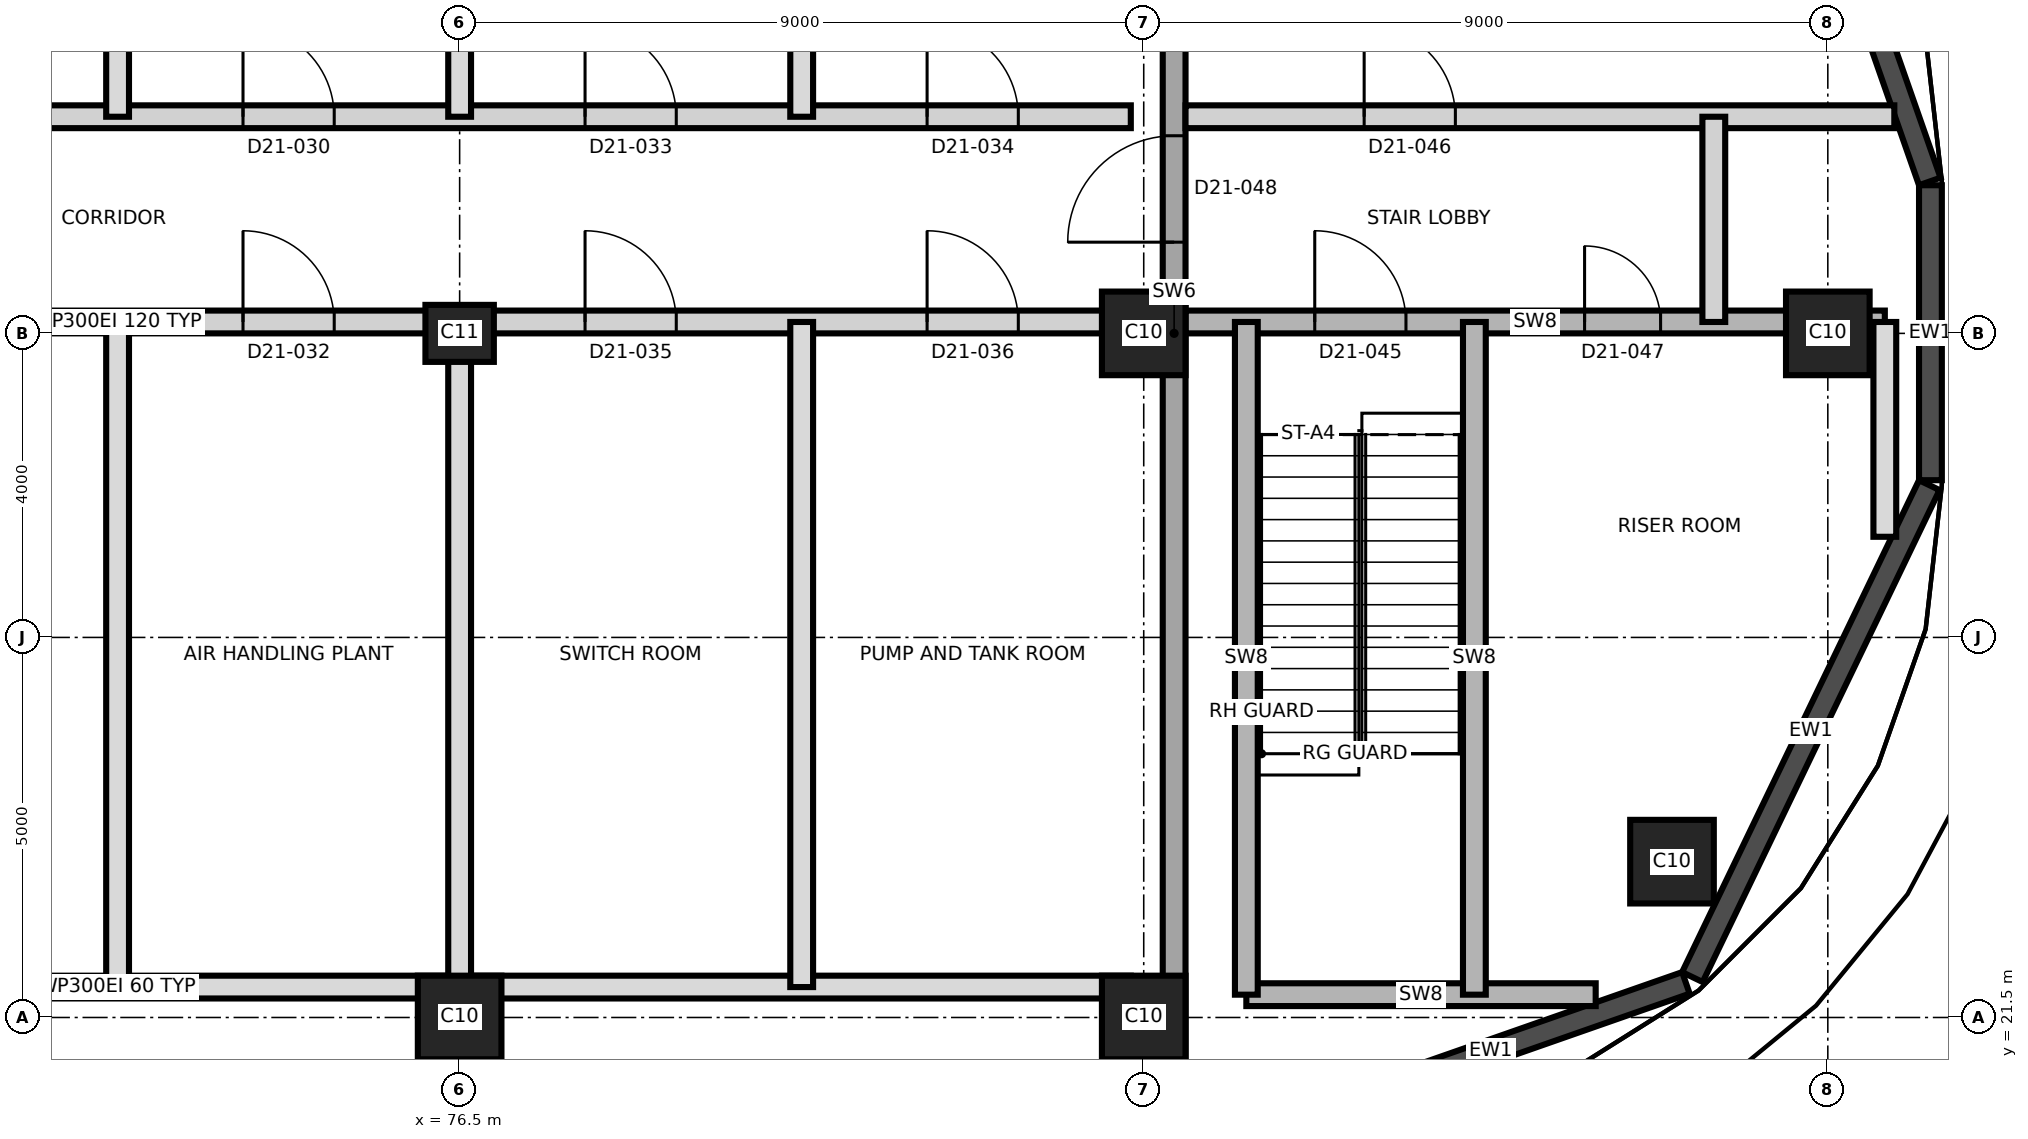
"""IFC4 building model, lengths in metres.
Left out: names, types, materials, properties, quantities, classifications, styles, units other than length and angle.
Written with IfcOpenShell. Run it as: python <this file> out.ifc"""

import sys

from ifc_helpers import new_model, si_unit, direction, frame, frame_2d, origin, origin_2d, place, context, subcontext, project, spatial, rectangle, extrude, element, fill, save


model = new_model("IFC4")
c1 = context("Model", 3, precision=1e-05, world=origin(), true_north=direction((0.0, 1.0)))
c2 = subcontext(c1, "Body", "Model", "MODEL_VIEW")
j1 = project(units=[si_unit("LENGTHUNIT", "METRE"), si_unit("PLANEANGLEUNIT", "RADIAN")], contexts=[c1])
p1 = place(None, origin())
s1 = spatial("IfcSite", under=j1, at=p1, CompositionType="ELEMENT")
p2 = place(p1, origin())
s2 = spatial("IfcBuilding", under=s1, at=p2, CompositionType="ELEMENT")
p3 = place(p2, frame((0.0, 0.0, 190.3)))
s3 = spatial("IfcBuildingStorey", under=s2, at=p3, CompositionType="ELEMENT", Elevation=190.3)
for number, where, z_axis, x_axis in (
    (1, (76.5, 21.5, 0.0), (0.0, 0.0, 1.0), (1.0, 0.0, 0.0)),
    (2, (85.5, 21.5, 0.0), (0.0, 0.0, 1.0), (1.0, 0.0, 0.0)),
    (3, (92.45, 23.55, 0.0), (0.0, 0.0, 1.0), (1.0, 0.0, 0.0)),
):
    element("IfcColumn", number, at=place(p3, frame(where, z_axis=z_axis, x_axis=x_axis)), inside=s3, PredefinedType="COLUMN", context=c2, shape_type="SweptSolid", body=[
        extrude(rectangle(XDim=1.1, YDim=1.1, at=origin_2d()), origin(), (0.0, 0.0, 1.0), 5.5),
    ])
p4 = place(p3, frame((76.5, 30.5, 0.0), z_axis=(0.0, 0.0, 1.0), x_axis=(1.0, 0.0, 0.0)))
e4 = element("IfcColumn", 4, at=p4, inside=s3, PredefinedType="COLUMN", context=c2, shape_type="SweptSolid", body=[
    extrude(rectangle(XDim=0.9, YDim=0.75, at=origin_2d()), origin(), (0.0, 0.0, 1.0), 5.5),
])
for number, where, z_axis, x_axis in (
    (5, (85.5, 30.5, 0.0), (0.0, 0.0, 1.0), (1.0, 0.0, 0.0)),
    (6, (94.5, 30.5, 0.0), (0.0, 0.0, 1.0), (1.0, 0.0, 0.0)),
):
    element("IfcColumn", number, at=place(p3, frame(where, z_axis=z_axis, x_axis=x_axis)), inside=s3, PredefinedType="COLUMN", context=c2, shape_type="SweptSolid", body=[
        extrude(rectangle(XDim=1.1, YDim=1.1, at=origin_2d()), origin(), (0.0, 0.0, 1.0), 5.5),
    ])
p5 = place(p3, frame((85.9, 20.35, 0.0), z_axis=(0.0, 0.0, 1.0), x_axis=(0.0, 1.0, 0.0)))
e7 = element("IfcWall", 7, at=p5, inside=s3, PredefinedType="SHEAR", context=c2, shape_type="SweptSolid", body=[
    extrude(rectangle(XDim=20.3, YDim=0.3, at=frame_2d((10.15, 0.0))), origin(), (0.0, 0.0, 1.0), 5.5),
])
p6 = place(p5, frame((11.35, 0.0, 0.0)))
e8 = element("IfcOpeningElement", 8, at=p6, cuts=e7, PredefinedType="OPENING", context=c2, shape_type="SweptSolid", body=[
    extrude(rectangle(XDim=1.4, YDim=2.1, at=frame_2d((0.7, 1.05))), frame((0.0, 0.16, 0.0), z_axis=(0.0, -1.0, 0.0), x_axis=(1.0, 0.0, 0.0)), (0.0, 0.0, 1.0), 0.32),
])
p7 = place(p3, frame((87.499, 20.158, 0.0), z_axis=(0.0, 0.0, 1.0), x_axis=(0.943879346284, 0.330290447423, 0.0)))
e9 = element("IfcWall", 9, at=p7, inside=s3, PredefinedType="SOLIDWALL", context=c2, shape_type="SweptSolid", body=[
    extrude(rectangle(XDim=5.439, YDim=0.3, at=frame_2d((2.72, 0.0))), origin(), (0.0, 0.0, 1.0), 5.2),
])
p8 = place(p3, frame((92.719, 22.031, 0.0), z_axis=(0.0, 0.0, 1.0), x_axis=(0.433882040461, 0.90096968593, 0.0)))
e10 = element("IfcWall", 10, at=p8, inside=s3, PredefinedType="SOLIDWALL", context=c2, shape_type="SweptSolid", body=[
    extrude(rectangle(XDim=7.183, YDim=0.3, at=frame_2d((3.592, 0.0))), origin(), (0.0, 0.0, 1.0), 5.2),
])
p9 = place(p3, frame((95.85, 28.568, 0.0), z_axis=(0.0, 0.0, 1.0), x_axis=(0.0, 1.0, 0.0)))
e11 = element("IfcWall", 11, at=p9, inside=s3, PredefinedType="SOLIDWALL", context=c2, shape_type="SweptSolid", body=[
    extrude(rectangle(XDim=3.881, YDim=0.3, at=frame_2d((1.94, 0.0))), origin(), (0.0, 0.0, 1.0), 5.2),
])
p10 = place(p3, frame((95.842, 32.499, 0.0), z_axis=(0.0, 0.0, 1.0), x_axis=(-0.330290447423, 0.943879346284, 0.0)))
e12 = element("IfcWall", 12, at=p10, inside=s3, PredefinedType="SOLIDWALL", context=c2, shape_type="SweptSolid", body=[
    extrude(rectangle(XDim=5.439, YDim=0.3, at=frame_2d((2.72, 0.0))), origin(), (0.0, 0.0, 1.0), 5.2),
])
p11 = place(p3, frame((86.85, 21.8, 0.0), z_axis=(0.0, 0.0, 1.0), x_axis=(1.0, 0.0, 0.0)))
e13 = element("IfcWall", 13, at=p11, inside=s3, PredefinedType="SHEAR", context=c2, shape_type="SweptSolid", body=[
    extrude(rectangle(XDim=4.596, YDim=0.3, at=frame_2d((2.298, 0.0))), origin(), (0.0, 0.0, 1.0), 5.2),
])
p12 = place(p3, frame((58.65, 21.9, 0.0), z_axis=(0.0, 0.0, 1.0), x_axis=(1.0, 0.0, 0.0)))
e14 = element("IfcWall", 14, at=p12, inside=s3, PredefinedType="PARTITIONING", context=c2, shape_type="SweptSolid", body=[
    extrude(rectangle(XDim=26.68, YDim=0.3, at=frame_2d((13.34, 0.0))), origin(), (0.0, 0.0, 1.0), 5.2),
])
p13 = place(p3, frame((58.65, 30.65, 0.0), z_axis=(0.0, 0.0, 1.0), x_axis=(1.0, 0.0, 0.0)))
e15 = element("IfcWall", 15, at=p13, inside=s3, PredefinedType="PARTITIONING", context=c2, shape_type="SweptSolid", body=[
    extrude(rectangle(XDim=26.68, YDim=0.3, at=frame_2d((13.34, 0.0))), origin(), (0.0, 0.0, 1.0), 5.2),
])
p14 = place(p13, frame((1.5, 0.0, 0.0)))
e16 = element("IfcOpeningElement", 16, at=p14, cuts=e15, PredefinedType="OPENING", context=c2, shape_type="SweptSolid", body=[
    extrude(rectangle(XDim=1.2, YDim=2.1, at=frame_2d((0.6, 1.05))), frame((0.0, 0.16, 0.0), z_axis=(0.0, -1.0, 0.0), x_axis=(1.0, 0.0, 0.0)), (0.0, 0.0, 1.0), 0.32),
])
p15 = place(p13, frame((6.0, 0.0, 0.0)))
e17 = element("IfcOpeningElement", 17, at=p15, cuts=e15, PredefinedType="OPENING", context=c2, shape_type="SweptSolid", body=[
    extrude(rectangle(XDim=1.2, YDim=2.1, at=frame_2d((0.6, 1.05))), frame((0.0, 0.16, 0.0), z_axis=(0.0, -1.0, 0.0), x_axis=(1.0, 0.0, 0.0)), (0.0, 0.0, 1.0), 0.32),
])
p16 = place(p13, frame((10.5, 0.0, 0.0)))
e18 = element("IfcOpeningElement", 18, at=p16, cuts=e15, PredefinedType="OPENING", context=c2, shape_type="SweptSolid", body=[
    extrude(rectangle(XDim=1.2, YDim=2.1, at=frame_2d((0.6, 1.05))), frame((0.0, 0.16, 0.0), z_axis=(0.0, -1.0, 0.0), x_axis=(1.0, 0.0, 0.0)), (0.0, 0.0, 1.0), 0.32),
])
p17 = place(p13, frame((15.0, 0.0, 0.0)))
e19 = element("IfcOpeningElement", 19, at=p17, cuts=e15, PredefinedType="OPENING", context=c2, shape_type="SweptSolid", body=[
    extrude(rectangle(XDim=1.2, YDim=2.1, at=frame_2d((0.6, 1.05))), frame((0.0, 0.16, 0.0), z_axis=(0.0, -1.0, 0.0), x_axis=(1.0, 0.0, 0.0)), (0.0, 0.0, 1.0), 0.32),
])
p18 = place(p13, frame((19.5, 0.0, 0.0)))
e20 = element("IfcOpeningElement", 20, at=p18, cuts=e15, PredefinedType="OPENING", context=c2, shape_type="SweptSolid", body=[
    extrude(rectangle(XDim=1.2, YDim=2.1, at=frame_2d((0.6, 1.05))), frame((0.0, 0.16, 0.0), z_axis=(0.0, -1.0, 0.0), x_axis=(1.0, 0.0, 0.0)), (0.0, 0.0, 1.0), 0.32),
])
p19 = place(p13, frame((24.0, 0.0, 0.0)))
e21 = element("IfcOpeningElement", 21, at=p19, cuts=e15, PredefinedType="OPENING", context=c2, shape_type="SweptSolid", body=[
    extrude(rectangle(XDim=1.2, YDim=2.1, at=frame_2d((0.6, 1.05))), frame((0.0, 0.16, 0.0), z_axis=(0.0, -1.0, 0.0), x_axis=(1.0, 0.0, 0.0)), (0.0, 0.0, 1.0), 0.32),
])
p20 = place(p3, frame((86.05, 30.65, 0.0), z_axis=(0.0, 0.0, 1.0), x_axis=(1.0, 0.0, 0.0)))
e22 = element("IfcWall", 22, at=p20, inside=s3, PredefinedType="SHEAR", context=c2, shape_type="SweptSolid", body=[
    extrude(rectangle(XDim=9.2, YDim=0.3, at=frame_2d((4.6, 0.0))), origin(), (0.0, 0.0, 1.0), 5.2),
])
p21 = place(p20, frame((1.7, 0.0, 0.0)))
e23 = element("IfcOpeningElement", 23, at=p21, cuts=e22, PredefinedType="OPENING", context=c2, shape_type="SweptSolid", body=[
    extrude(rectangle(XDim=1.2, YDim=2.1, at=frame_2d((0.6, 1.05))), frame((0.0, 0.16, 0.0), z_axis=(0.0, -1.0, 0.0), x_axis=(1.0, 0.0, 0.0)), (0.0, 0.0, 1.0), 0.32),
])
p22 = place(p20, frame((5.25, 0.0, 0.0)))
e24 = element("IfcOpeningElement", 24, at=p22, cuts=e22, PredefinedType="OPENING", context=c2, shape_type="SweptSolid", body=[
    extrude(rectangle(XDim=1.0, YDim=2.1, at=frame_2d((0.5, 1.05))), frame((0.0, 0.16, 0.0), z_axis=(0.0, -1.0, 0.0), x_axis=(1.0, 0.0, 0.0)), (0.0, 0.0, 1.0), 0.32),
])
p23 = place(p3, frame((58.65, 33.35, 0.0), z_axis=(0.0, 0.0, 1.0), x_axis=(1.0, 0.0, 0.0)))
e25 = element("IfcWall", 25, at=p23, inside=s3, PredefinedType="PARTITIONING", context=c2, shape_type="SweptSolid", body=[
    extrude(rectangle(XDim=26.68, YDim=0.3, at=frame_2d((13.34, 0.0))), origin(), (0.0, 0.0, 1.0), 5.2),
])
p24 = place(p23, frame((1.5, 0.0, 0.0)))
e26 = element("IfcOpeningElement", 26, at=p24, cuts=e25, PredefinedType="OPENING", context=c2, shape_type="SweptSolid", body=[
    extrude(rectangle(XDim=1.2, YDim=2.1, at=frame_2d((0.6, 1.05))), frame((0.0, 0.16, 0.0), z_axis=(0.0, -1.0, 0.0), x_axis=(1.0, 0.0, 0.0)), (0.0, 0.0, 1.0), 0.32),
])
p25 = place(p23, frame((6.0, 0.0, 0.0)))
e27 = element("IfcOpeningElement", 27, at=p25, cuts=e25, PredefinedType="OPENING", context=c2, shape_type="SweptSolid", body=[
    extrude(rectangle(XDim=1.2, YDim=2.1, at=frame_2d((0.6, 1.05))), frame((0.0, 0.16, 0.0), z_axis=(0.0, -1.0, 0.0), x_axis=(1.0, 0.0, 0.0)), (0.0, 0.0, 1.0), 0.32),
])
p26 = place(p23, frame((10.5, 0.0, 0.0)))
e28 = element("IfcOpeningElement", 28, at=p26, cuts=e25, PredefinedType="OPENING", context=c2, shape_type="SweptSolid", body=[
    extrude(rectangle(XDim=1.2, YDim=2.1, at=frame_2d((0.6, 1.05))), frame((0.0, 0.16, 0.0), z_axis=(0.0, -1.0, 0.0), x_axis=(1.0, 0.0, 0.0)), (0.0, 0.0, 1.0), 0.32),
])
p27 = place(p23, frame((15.0, 0.0, 0.0)))
e29 = element("IfcOpeningElement", 29, at=p27, cuts=e25, PredefinedType="OPENING", context=c2, shape_type="SweptSolid", body=[
    extrude(rectangle(XDim=1.2, YDim=2.1, at=frame_2d((0.6, 1.05))), frame((0.0, 0.16, 0.0), z_axis=(0.0, -1.0, 0.0), x_axis=(1.0, 0.0, 0.0)), (0.0, 0.0, 1.0), 0.32),
])
p28 = place(p23, frame((19.5, 0.0, 0.0)))
e30 = element("IfcOpeningElement", 30, at=p28, cuts=e25, PredefinedType="OPENING", context=c2, shape_type="SweptSolid", body=[
    extrude(rectangle(XDim=1.2, YDim=2.1, at=frame_2d((0.6, 1.05))), frame((0.0, 0.16, 0.0), z_axis=(0.0, -1.0, 0.0), x_axis=(1.0, 0.0, 0.0)), (0.0, 0.0, 1.0), 0.32),
])
p29 = place(p23, frame((24.0, 0.0, 0.0)))
e31 = element("IfcOpeningElement", 31, at=p29, cuts=e25, PredefinedType="OPENING", context=c2, shape_type="SweptSolid", body=[
    extrude(rectangle(XDim=1.2, YDim=2.1, at=frame_2d((0.6, 1.05))), frame((0.0, 0.16, 0.0), z_axis=(0.0, -1.0, 0.0), x_axis=(1.0, 0.0, 0.0)), (0.0, 0.0, 1.0), 0.32),
])
p30 = place(p3, frame((86.05, 33.35, 0.0), z_axis=(0.0, 0.0, 1.0), x_axis=(1.0, 0.0, 0.0)))
e32 = element("IfcWall", 32, at=p30, inside=s3, PredefinedType="PARTITIONING", context=c2, shape_type="SweptSolid", body=[
    extrude(rectangle(XDim=9.325, YDim=0.3, at=frame_2d((4.663, 0.0))), origin(), (0.0, 0.0, 1.0), 5.2),
])
p31 = place(p30, frame((2.35, 0.0, 0.0)))
e33 = element("IfcOpeningElement", 33, at=p31, cuts=e32, PredefinedType="OPENING", context=c2, shape_type="SweptSolid", body=[
    extrude(rectangle(XDim=1.2, YDim=2.1, at=frame_2d((0.6, 1.05))), frame((0.0, 0.16, 0.0), z_axis=(0.0, -1.0, 0.0), x_axis=(1.0, 0.0, 0.0)), (0.0, 0.0, 1.0), 0.32),
])
p32 = place(p3, frame((72.0, 21.9, 0.0), z_axis=(0.0, 0.0, 1.0), x_axis=(0.0, 1.0, 0.0)))
e34 = element("IfcWall", 34, at=p32, inside=s3, PredefinedType="PARTITIONING", context=c2, shape_type="SweptSolid", body=[
    extrude(rectangle(XDim=8.75, YDim=0.3, at=frame_2d((4.375, 0.0))), origin(), (0.0, 0.0, 1.0), 5.2),
])
p33 = place(p3, frame((72.0, 33.35, 0.0), z_axis=(0.0, 0.0, 1.0), x_axis=(0.0, 1.0, 0.0)))
e35 = element("IfcWall", 35, at=p33, inside=s3, PredefinedType="PARTITIONING", context=c2, shape_type="SweptSolid", body=[
    extrude(rectangle(XDim=5.75, YDim=0.3, at=frame_2d((2.875, 0.0))), origin(), (0.0, 0.0, 1.0), 5.2),
])
p34 = place(p3, frame((76.5, 21.9, 0.0), z_axis=(0.0, 0.0, 1.0), x_axis=(0.0, 1.0, 0.0)))
e36 = element("IfcWall", 36, at=p34, inside=s3, PredefinedType="PARTITIONING", context=c2, shape_type="SweptSolid", body=[
    extrude(rectangle(XDim=8.75, YDim=0.3, at=frame_2d((4.375, 0.0))), origin(), (0.0, 0.0, 1.0), 5.2),
])
p35 = place(p3, frame((76.5, 33.35, 0.0), z_axis=(0.0, 0.0, 1.0), x_axis=(0.0, 1.0, 0.0)))
e37 = element("IfcWall", 37, at=p35, inside=s3, PredefinedType="PARTITIONING", context=c2, shape_type="SweptSolid", body=[
    extrude(rectangle(XDim=5.75, YDim=0.3, at=frame_2d((2.875, 0.0))), origin(), (0.0, 0.0, 1.0), 5.2),
])
p36 = place(p3, frame((81.0, 21.9, 0.0), z_axis=(0.0, 0.0, 1.0), x_axis=(0.0, 1.0, 0.0)))
e38 = element("IfcWall", 38, at=p36, inside=s3, PredefinedType="PARTITIONING", context=c2, shape_type="SweptSolid", body=[
    extrude(rectangle(XDim=8.75, YDim=0.3, at=frame_2d((4.375, 0.0))), origin(), (0.0, 0.0, 1.0), 5.2),
])
p37 = place(p3, frame((81.0, 33.35, 0.0), z_axis=(0.0, 0.0, 1.0), x_axis=(0.0, 1.0, 0.0)))
e39 = element("IfcWall", 39, at=p37, inside=s3, PredefinedType="PARTITIONING", context=c2, shape_type="SweptSolid", body=[
    extrude(rectangle(XDim=5.75, YDim=0.3, at=frame_2d((2.875, 0.0))), origin(), (0.0, 0.0, 1.0), 5.2),
])
for number, where, z_axis, x_axis in (
    (40, (86.85, 21.8, 0.0), (0.0, 0.0, 1.0), (0.0, 1.0, 0.0)),
    (41, (89.85, 21.8, 0.0), (0.0, 0.0, 1.0), (0.0, 1.0, 0.0)),
):
    element("IfcWall", number, at=place(p3, frame(where, z_axis=z_axis, x_axis=x_axis)), inside=s3, PredefinedType="SHEAR", context=c2, shape_type="SweptSolid", body=[
        extrude(rectangle(XDim=8.85, YDim=0.3, at=frame_2d((4.425, 0.0))), origin(), (0.0, 0.0, 1.0), 5.2),
    ])
p38 = place(p3, frame((93.0, 30.65, 0.0), z_axis=(0.0, 0.0, 1.0), x_axis=(0.0, 1.0, 0.0)))
e42 = element("IfcWall", 42, at=p38, inside=s3, PredefinedType="PARTITIONING", context=c2, shape_type="SweptSolid", body=[
    extrude(rectangle(XDim=2.7, YDim=0.3, at=frame_2d((1.35, 0.0))), origin(), (0.0, 0.0, 1.0), 5.2),
])
p39 = place(p3, frame((95.25, 27.824, 0.0), z_axis=(0.0, 0.0, 1.0), x_axis=(0.0, 1.0, 0.0)))
e43 = element("IfcWall", 43, at=p39, inside=s3, PredefinedType="PARTITIONING", context=c2, shape_type="SweptSolid", body=[
    extrude(rectangle(XDim=2.826, YDim=0.3, at=frame_2d((1.413, 0.0))), origin(), (0.0, 0.0, 1.0), 5.2),
])
p40 = place(p27, origin())
e44 = element("IfcDoor", 44, at=p40, inside=s3, OperationType="SINGLE_SWING_RIGHT", PredefinedType="DOOR", context=c2, shape_type="SweptSolid", body=[
    extrude(rectangle(XDim=1.2, YDim=2.1, at=frame_2d((0.6, 1.05))), frame((0.0, 0.025, 0.0), z_axis=(0.0, -1.0, 0.0), x_axis=(1.0, 0.0, 0.0)), (0.0, 0.0, 1.0), 0.05),
])
fill(e29, e44)
p41 = place(p17, origin())
e45 = element("IfcDoor", 45, at=p41, inside=s3, OperationType="SINGLE_SWING_LEFT", PredefinedType="DOOR", context=c2, shape_type="SweptSolid", body=[
    extrude(rectangle(XDim=1.2, YDim=2.1, at=frame_2d((0.6, 1.05))), frame((0.0, 0.025, 0.0), z_axis=(0.0, -1.0, 0.0), x_axis=(1.0, 0.0, 0.0)), (0.0, 0.0, 1.0), 0.05),
])
fill(e19, e45)
p42 = place(p28, origin())
e46 = element("IfcDoor", 46, at=p42, inside=s3, OperationType="SINGLE_SWING_RIGHT", PredefinedType="DOOR", context=c2, shape_type="SweptSolid", body=[
    extrude(rectangle(XDim=1.2, YDim=2.1, at=frame_2d((0.6, 1.05))), frame((0.0, 0.025, 0.0), z_axis=(0.0, -1.0, 0.0), x_axis=(1.0, 0.0, 0.0)), (0.0, 0.0, 1.0), 0.05),
])
fill(e30, e46)
p43 = place(p29, origin())
e47 = element("IfcDoor", 47, at=p43, inside=s3, OperationType="SINGLE_SWING_LEFT", PredefinedType="DOOR", context=c2, shape_type="SweptSolid", body=[
    extrude(rectangle(XDim=1.2, YDim=2.1, at=frame_2d((0.6, 1.05))), frame((0.0, 0.025, 0.0), z_axis=(0.0, -1.0, 0.0), x_axis=(1.0, 0.0, 0.0)), (0.0, 0.0, 1.0), 0.05),
])
fill(e31, e47)
p44 = place(p18, origin())
e48 = element("IfcDoor", 48, at=p44, inside=s3, OperationType="SINGLE_SWING_LEFT", PredefinedType="DOOR", context=c2, shape_type="SweptSolid", body=[
    extrude(rectangle(XDim=1.2, YDim=2.1, at=frame_2d((0.6, 1.05))), frame((0.0, 0.025, 0.0), z_axis=(0.0, -1.0, 0.0), x_axis=(1.0, 0.0, 0.0)), (0.0, 0.0, 1.0), 0.05),
])
fill(e20, e48)
p45 = place(p19, origin())
e49 = element("IfcDoor", 49, at=p45, inside=s3, OperationType="SINGLE_SWING_RIGHT", PredefinedType="DOOR", context=c2, shape_type="SweptSolid", body=[
    extrude(rectangle(XDim=1.2, YDim=2.1, at=frame_2d((0.6, 1.05))), frame((0.0, 0.025, 0.0), z_axis=(0.0, -1.0, 0.0), x_axis=(1.0, 0.0, 0.0)), (0.0, 0.0, 1.0), 0.05),
])
fill(e21, e49)
p46 = place(p21, origin())
e50 = element("IfcDoor", 50, at=p46, inside=s3, OperationType="SINGLE_SWING_LEFT", PredefinedType="DOOR", context=c2, shape_type="SweptSolid", body=[
    extrude(rectangle(XDim=1.2, YDim=2.1, at=frame_2d((0.6, 1.05))), frame((0.0, 0.025, 0.0), z_axis=(0.0, -1.0, 0.0), x_axis=(1.0, 0.0, 0.0)), (0.0, 0.0, 1.0), 0.05),
])
fill(e23, e50)
p47 = place(p31, origin())
e51 = element("IfcDoor", 51, at=p47, inside=s3, OperationType="SINGLE_SWING_LEFT", PredefinedType="DOOR", context=c2, shape_type="SweptSolid", body=[
    extrude(rectangle(XDim=1.2, YDim=2.1, at=frame_2d((0.6, 1.05))), frame((0.0, 0.025, 0.0), z_axis=(0.0, -1.0, 0.0), x_axis=(1.0, 0.0, 0.0)), (0.0, 0.0, 1.0), 0.05),
])
fill(e33, e51)
p48 = place(p22, origin())
e52 = element("IfcDoor", 52, at=p48, inside=s3, OperationType="SINGLE_SWING_LEFT", PredefinedType="DOOR", context=c2, shape_type="SweptSolid", body=[
    extrude(rectangle(XDim=1.0, YDim=2.1, at=frame_2d((0.5, 1.05))), frame((0.0, 0.025, 0.0), z_axis=(0.0, -1.0, 0.0), x_axis=(1.0, 0.0, 0.0)), (0.0, 0.0, 1.0), 0.05),
])
fill(e24, e52)
p49 = place(p6, origin())
e53 = element("IfcDoor", 53, at=p49, inside=s3, OperationType="SINGLE_SWING_RIGHT", PredefinedType="DOOR", context=c2, shape_type="SweptSolid", body=[
    extrude(rectangle(XDim=1.4, YDim=2.1, at=frame_2d((0.7, 1.05))), frame((0.0, 0.025, 0.0), z_axis=(0.0, -1.0, 0.0), x_axis=(1.0, 0.0, 0.0)), (0.0, 0.0, 1.0), 0.05),
])
fill(e8, e53)
save(model, sys.argv[1])
